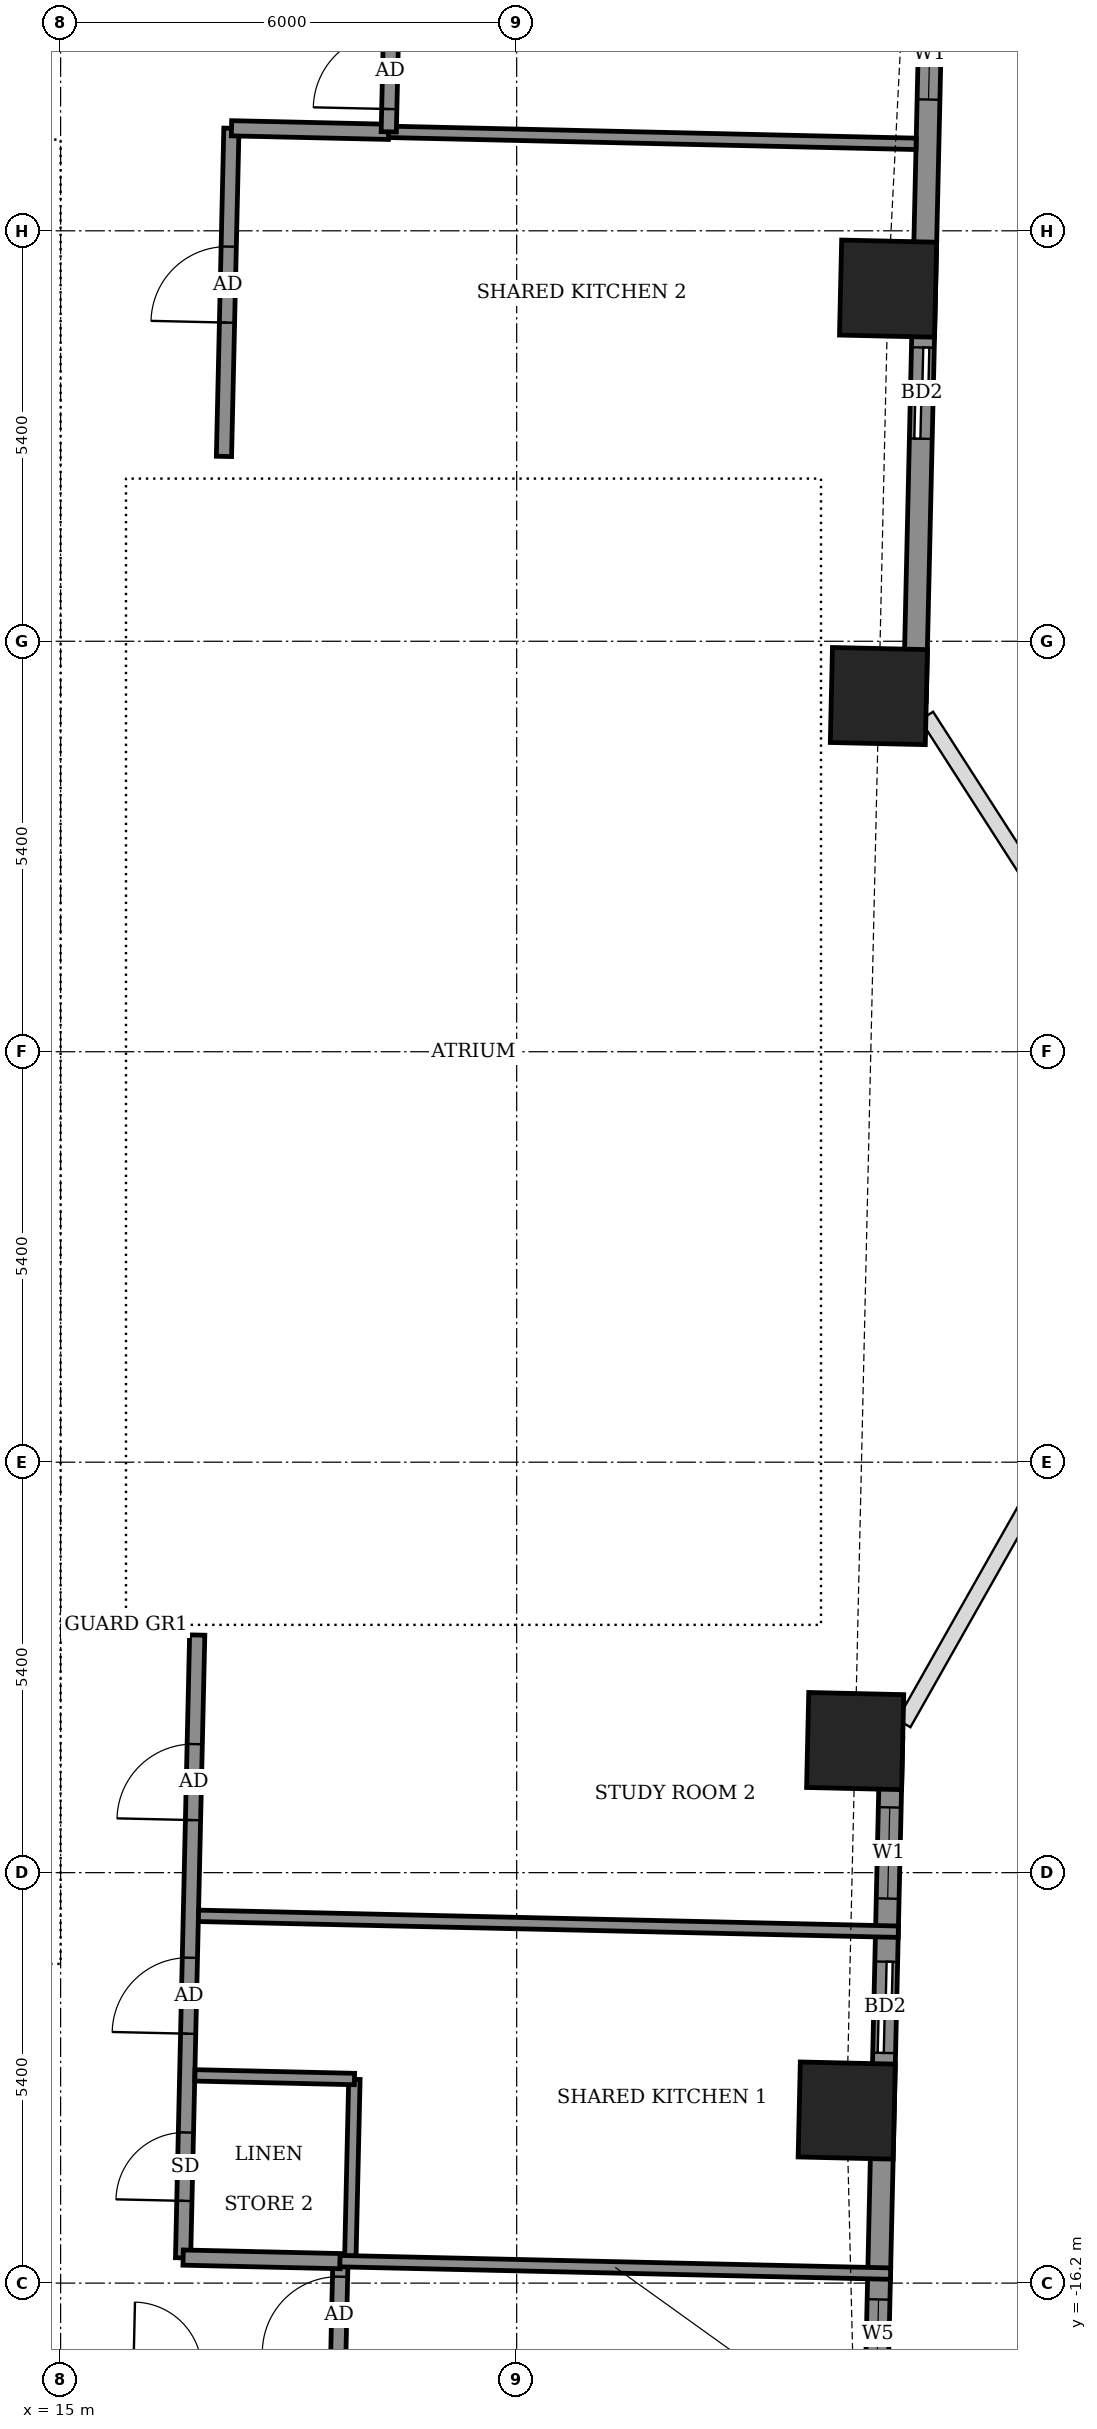
"""IFC4 building model, lengths in metres.
Left out: names, types, materials, properties, quantities, classifications, styles, units other than length and angle.
Written with IfcOpenShell. Run it as: python <this file> out.ifc"""

import sys

from ifc_helpers import new_model, si_unit, direction, frame, frame_2d, origin, origin_2d, place, context, subcontext, project, spatial, rectangle, extrude, element, fill, save


model = new_model("IFC4")
c1 = context("Model", 3, precision=1e-05, world=origin(), true_north=direction((0.0, 1.0)))
c2 = subcontext(c1, "Body", "Model", "MODEL_VIEW")
j1 = project(units=[si_unit("LENGTHUNIT", "METRE"), si_unit("PLANEANGLEUNIT", "RADIAN")], contexts=[c1])
p1 = place(None, origin())
s1 = spatial("IfcSite", under=j1, at=p1, CompositionType="ELEMENT")
p2 = place(p1, origin())
s2 = spatial("IfcBuilding", under=s1, at=p2, CompositionType="ELEMENT")
p3 = place(p2, frame((0.0, 0.0, 163.5)))
s3 = spatial("IfcBuildingStorey", under=s2, at=p3, CompositionType="ELEMENT", Elevation=163.5)
for number, where, z_axis, x_axis in (
    (1, (25.342, -13.93, -0.55), (0.0, 0.0, 1.0), (0.023, 1.0, 0.0)),
    (2, (25.453, -9.069, -0.55), (0.0, 0.0, 1.0), (0.023, 1.0, 0.0)),
    (3, (25.765, 4.679, -0.55), (0.0, 0.0, 1.0), (0.023, 1.0, 0.0)),
    (4, (25.886, 10.039, -0.55), (0.0, 0.0, 1.0), (0.023, 1.0, 0.0)),
):
    element("IfcColumn", number, at=place(p3, frame(where, z_axis=z_axis, x_axis=x_axis)), inside=s3, PredefinedType="COLUMN", context=c2, shape_type="SweptSolid", body=[
        extrude(rectangle(XDim=1.25, YDim=1.25, at=origin_2d()), origin(), (0.0, 0.0, 1.0), 3.6),
    ])
p4 = place(p3, frame((25.71, -18.651, 0.0), z_axis=(0.0, 0.0, 1.0), x_axis=(0.02274444447, 0.999741311663, 0.0)))
e5 = element("IfcWall", 5, at=p4, inside=s3, PredefinedType="SOLIDWALL", context=c2, shape_type="SweptSolid", body=[
    extrude(rectangle(XDim=9.628, YDim=0.3, at=frame_2d((4.814, 0.0))), origin(), (0.0, 0.0, 1.0), 2.55),
])
p5 = place(p4, frame((1.337, 0.0, 0.9)))
e6 = element("IfcOpeningElement", 6, at=p5, cuts=e5, PredefinedType="OPENING", context=c2, shape_type="SweptSolid", body=[
    extrude(rectangle(XDim=0.9, YDim=1.5, at=frame_2d((0.45, 0.75))), frame((0.0, 0.16, 0.0), z_axis=(0.0, -1.0, 0.0), x_axis=(1.0, 0.0, 0.0)), (0.0, 0.0, 1.0), 0.32),
])
p6 = place(p4, frame((5.481, 0.0, 0.0)))
e7 = element("IfcOpeningElement", 7, at=p6, cuts=e5, PredefinedType="OPENING", context=c2, shape_type="SweptSolid", body=[
    extrude(rectangle(XDim=1.2, YDim=2.4, at=frame_2d((0.6, 1.2))), frame((0.0, 0.16, 0.0), z_axis=(0.0, -1.0, 0.0), x_axis=(1.0, 0.0, 0.0)), (0.0, 0.0, 1.0), 0.32),
])
p7 = place(p4, frame((7.512, 0.0, 0.9)))
e8 = element("IfcOpeningElement", 8, at=p7, cuts=e5, PredefinedType="OPENING", context=c2, shape_type="SweptSolid", body=[
    extrude(rectangle(XDim=1.2, YDim=1.5, at=frame_2d((0.6, 0.75))), frame((0.0, 0.16, 0.0), z_axis=(0.0, -1.0, 0.0), x_axis=(1.0, 0.0, 0.0)), (0.0, 0.0, 1.0), 0.32),
])
p8 = place(p3, frame((26.238, 4.613, 0.0), z_axis=(0.0, 0.0, 1.0), x_axis=(0.022761056451, 0.999740933597, 0.0)))
e9 = element("IfcWall", 9, at=p8, inside=s3, PredefinedType="SOLIDWALL", context=c2, shape_type="SweptSolid", body=[
    extrude(rectangle(XDim=10.63, YDim=0.3, at=frame_2d((5.315, 0.0))), origin(), (0.0, 0.0, 1.0), 3.05),
])
p9 = place(p8, frame((3.453, 0.0, 0.0)))
e10 = element("IfcOpeningElement", 10, at=p9, cuts=e9, PredefinedType="OPENING", context=c2, shape_type="SweptSolid", body=[
    extrude(rectangle(XDim=1.2, YDim=2.4, at=frame_2d((0.6, 1.2))), frame((0.0, 0.16, 0.0), z_axis=(0.0, -1.0, 0.0), x_axis=(1.0, 0.0, 0.0)), (0.0, 0.0, 1.0), 0.32),
])
p10 = place(p8, frame((7.916, 0.0, 0.9)))
e11 = element("IfcOpeningElement", 11, at=p10, cuts=e9, PredefinedType="OPENING", context=c2, shape_type="SweptSolid", body=[
    extrude(rectangle(XDim=1.2, YDim=1.5, at=frame_2d((0.6, 0.75))), frame((0.0, 0.16, 0.0), z_axis=(0.0, -1.0, 0.0), x_axis=(1.0, 0.0, 0.0)), (0.0, 0.0, 1.0), 0.32),
])
p11 = place(p3, frame((18.647, -17.415, 0.0), z_axis=(0.0, 0.0, 1.0), x_axis=(0.022617910375, 0.999744182344, 0.0)))
e12 = element("IfcWall", 12, at=p11, inside=s3, PredefinedType="PARTITIONING", context=c2, shape_type="SweptSolid", body=[
    extrude(rectangle(XDim=1.5, YDim=0.2, at=frame_2d((0.75, 0.0))), origin(), (0.0, 0.0, 1.0), 3.05),
])
p12 = place(p11, frame((0.3, 0.0, 0.0)))
e13 = element("IfcOpeningElement", 13, at=p12, cuts=e12, PredefinedType="OPENING", context=c2, shape_type="SweptSolid", body=[
    extrude(rectangle(XDim=1.0, YDim=2.1, at=frame_2d((0.5, 1.05))), frame((0.0, 0.11, 0.0), z_axis=(0.0, -1.0, 0.0), x_axis=(1.0, 0.0, 0.0)), (0.0, 0.0, 1.0), 0.22),
])
p13 = place(p3, frame((16.611, -15.868, 0.0), z_axis=(0.0, 0.0, 1.0), x_axis=(0.022698399288, 0.999742358145, 0.0)))
e14 = element("IfcWall", 14, at=p13, inside=s3, PredefinedType="PARTITIONING", context=c2, shape_type="SweptSolid", body=[
    extrude(rectangle(XDim=8.196, YDim=0.2, at=frame_2d((4.098, 0.0))), origin(), (0.0, 0.0, 1.0), 3.05),
])
p14 = place(p13, frame((2.95, 0.0, 0.0)))
e15 = element("IfcOpeningElement", 15, at=p14, cuts=e14, PredefinedType="OPENING", context=c2, shape_type="SweptSolid", body=[
    extrude(rectangle(XDim=1.0, YDim=2.1, at=frame_2d((0.5, 1.05))), frame((0.0, 0.11, 0.0), z_axis=(0.0, -1.0, 0.0), x_axis=(1.0, 0.0, 0.0)), (0.0, 0.0, 1.0), 0.22),
])
p15 = place(p13, frame((0.75, 0.0, 0.0)))
e16 = element("IfcOpeningElement", 16, at=p15, cuts=e14, PredefinedType="OPENING", context=c2, shape_type="SweptSolid", body=[
    extrude(rectangle(XDim=0.9, YDim=2.1, at=frame_2d((0.45, 1.05))), frame((0.0, 0.11, 0.0), z_axis=(0.0, -1.0, 0.0), x_axis=(1.0, 0.0, 0.0)), (0.0, 0.0, 1.0), 0.22),
])
p16 = place(p13, frame((5.761, 0.0, 0.0)))
e17 = element("IfcOpeningElement", 17, at=p16, cuts=e14, PredefinedType="OPENING", context=c2, shape_type="SweptSolid", body=[
    extrude(rectangle(XDim=1.0, YDim=2.1, at=frame_2d((0.5, 1.05))), frame((0.0, 0.11, 0.0), z_axis=(0.0, -1.0, 0.0), x_axis=(1.0, 0.0, 0.0)), (0.0, 0.0, 1.0), 0.22),
])
p17 = place(p3, frame((18.812, -15.843, 0.0), z_axis=(0.0, 0.0, 1.0), x_axis=(0.02279059109, 0.999740260747, 0.0)))
e18 = element("IfcWall", 18, at=p17, inside=s3, PredefinedType="PARTITIONING", context=c2, shape_type="SweptSolid", body=[
    extrude(rectangle(XDim=2.324, YDim=0.15, at=frame_2d((1.162, 0.0))), origin(), (0.0, 0.0, 1.0), 3.05),
])
p18 = place(p3, frame((16.612, -15.864, 0.0), z_axis=(0.0, 0.0, 1.0), x_axis=(0.999742931749, -0.02267312106, 0.0)))
e19 = element("IfcWall", 19, at=p18, inside=s3, PredefinedType="PARTITIONING", context=c2, shape_type="SweptSolid", body=[
    extrude(rectangle(XDim=2.067, YDim=0.2, at=frame_2d((1.034, 0.0))), origin(), (0.0, 0.0, 1.0), 3.05),
])
p19 = place(p3, frame((18.675, -15.911, 0.0), z_axis=(0.0, 0.0, 1.0), x_axis=(0.999743624132, -0.022642570706, 0.0)))
e20 = element("IfcWall", 20, at=p19, inside=s3, PredefinedType="PARTITIONING", context=c2, shape_type="SweptSolid", body=[
    extrude(rectangle(XDim=7.246, YDim=0.15, at=frame_2d((3.623, 0.0))), origin(), (0.0, 0.0, 1.0), 2.55),
])
p20 = place(p3, frame((16.767, -13.467, 0.0), z_axis=(0.0, 0.0, 1.0), x_axis=(0.999740212033, -0.022792727877, 0.0)))
e21 = element("IfcWall", 21, at=p20, inside=s3, PredefinedType="PARTITIONING", context=c2, shape_type="SweptSolid", body=[
    extrude(rectangle(XDim=2.099, YDim=0.15, at=frame_2d((1.05, 0.0))), origin(), (0.0, 0.0, 1.0), 3.05),
])
p21 = place(p3, frame((16.814, -11.368, 0.0), z_axis=(0.0, 0.0, 1.0), x_axis=(0.999742492059, -0.02269250035, 0.0)))
e22 = element("IfcWall", 22, at=p21, inside=s3, PredefinedType="PARTITIONING", context=c2, shape_type="SweptSolid", body=[
    extrude(rectangle(XDim=9.209, YDim=0.15, at=frame_2d((4.605, 0.0))), origin(), (0.0, 0.0, 1.0), 2.55),
])
p22 = place(p3, frame((17.149, 7.832, 0.0), z_axis=(0.0, 0.0, 1.0), x_axis=(0.022729111383, 0.999741660378, 0.0)))
e23 = element("IfcWall", 23, at=p22, inside=s3, PredefinedType="PARTITIONING", context=c2, shape_type="SweptSolid", body=[
    extrude(rectangle(XDim=4.318, YDim=0.2, at=frame_2d((2.159, 0.0))), origin(), (0.0, 0.0, 1.0), 3.05),
])
p23 = place(p22, frame((1.761, 0.0, 0.0)))
e24 = element("IfcOpeningElement", 24, at=p23, cuts=e23, PredefinedType="OPENING", context=c2, shape_type="SweptSolid", body=[
    extrude(rectangle(XDim=1.0, YDim=2.1, at=frame_2d((0.5, 1.05))), frame((0.0, 0.11, 0.0), z_axis=(0.0, -1.0, 0.0), x_axis=(1.0, 0.0, 0.0)), (0.0, 0.0, 1.0), 0.22),
])
p24 = place(p3, frame((17.248, 12.149, 0.0), z_axis=(0.0, 0.0, 1.0), x_axis=(0.999742931749, -0.02267312106, 0.0)))
e25 = element("IfcWall", 25, at=p24, inside=s3, PredefinedType="PARTITIONING", context=c2, shape_type="SweptSolid", body=[
    extrude(rectangle(XDim=2.067, YDim=0.2, at=frame_2d((1.034, 0.0))), origin(), (0.0, 0.0, 1.0), 3.05),
])
p25 = place(p3, frame((19.315, 12.102, 0.0), z_axis=(0.0, 0.0, 1.0), x_axis=(0.999741072391, -0.022754959327, 0.0)))
e26 = element("IfcWall", 26, at=p25, inside=s3, PredefinedType="PARTITIONING", context=c2, shape_type="SweptSolid", body=[
    extrude(rectangle(XDim=6.942, YDim=0.15, at=frame_2d((3.471, 0.0))), origin(), (0.0, 0.0, 1.0), 2.55),
])
p26 = place(p3, frame((19.317, 12.102, 0.0), z_axis=(0.0, 0.0, 1.0), x_axis=(0.02279537805, 0.999740151609, 0.0)))
e27 = element("IfcWall", 27, at=p26, inside=s3, PredefinedType="PARTITIONING", context=c2, shape_type="SweptSolid", body=[
    extrude(rectangle(XDim=1.5, YDim=0.2, at=frame_2d((0.75, 0.0))), origin(), (0.0, 0.0, 1.0), 3.05),
])
p27 = place(p26, frame((0.3, 0.0, 0.0)))
e28 = element("IfcOpeningElement", 28, at=p27, cuts=e27, PredefinedType="OPENING", context=c2, shape_type="SweptSolid", body=[
    extrude(rectangle(XDim=1.0, YDim=2.1, at=frame_2d((0.5, 1.05))), frame((0.0, 0.11, 0.0), z_axis=(0.0, -1.0, 0.0), x_axis=(1.0, 0.0, 0.0)), (0.0, 0.0, 1.0), 0.22),
])
p28 = place(p5, origin())
e29 = element("IfcWindow", 29, at=p28, inside=s3, PartitioningType="SINGLE_PANEL", PredefinedType="WINDOW", context=c2, shape_type="SweptSolid", body=[
    extrude(rectangle(XDim=0.9, YDim=1.5, at=frame_2d((0.45, 0.75))), frame((0.0, 0.03, 0.0), z_axis=(0.0, -1.0, 0.0), x_axis=(1.0, 0.0, 0.0)), (0.0, 0.0, 1.0), 0.06),
])
fill(e6, e29)
p29 = place(p6, origin())
e30 = element("IfcDoor", 30, at=p29, inside=s3, OperationType="SLIDING_TO_LEFT", PredefinedType="DOOR", context=c2, shape_type="SweptSolid", body=[
    extrude(rectangle(XDim=1.2, YDim=2.4, at=frame_2d((0.6, 1.2))), frame((0.0, 0.025, 0.0), z_axis=(0.0, -1.0, 0.0), x_axis=(1.0, 0.0, 0.0)), (0.0, 0.0, 1.0), 0.05),
])
fill(e7, e30)
p30 = place(p7, origin())
e31 = element("IfcWindow", 31, at=p30, inside=s3, PartitioningType="SINGLE_PANEL", PredefinedType="WINDOW", context=c2, shape_type="SweptSolid", body=[
    extrude(rectangle(XDim=1.2, YDim=1.5, at=frame_2d((0.6, 0.75))), frame((0.0, 0.03, 0.0), z_axis=(0.0, -1.0, 0.0), x_axis=(1.0, 0.0, 0.0)), (0.0, 0.0, 1.0), 0.06),
])
fill(e8, e31)
p31 = place(p9, origin())
e32 = element("IfcDoor", 32, at=p31, inside=s3, OperationType="SLIDING_TO_LEFT", PredefinedType="DOOR", context=c2, shape_type="SweptSolid", body=[
    extrude(rectangle(XDim=1.2, YDim=2.4, at=frame_2d((0.6, 1.2))), frame((0.0, 0.025, 0.0), z_axis=(0.0, -1.0, 0.0), x_axis=(1.0, 0.0, 0.0)), (0.0, 0.0, 1.0), 0.05),
])
fill(e10, e32)
p32 = place(p10, origin())
e33 = element("IfcWindow", 33, at=p32, inside=s3, PartitioningType="SINGLE_PANEL", PredefinedType="WINDOW", context=c2, shape_type="SweptSolid", body=[
    extrude(rectangle(XDim=1.2, YDim=1.5, at=frame_2d((0.6, 0.75))), frame((0.0, 0.03, 0.0), z_axis=(0.0, -1.0, 0.0), x_axis=(1.0, 0.0, 0.0)), (0.0, 0.0, 1.0), 0.06),
])
fill(e11, e33)
p33 = place(p12, origin())
e34 = element("IfcDoor", 34, at=p33, inside=s3, OperationType="SINGLE_SWING_RIGHT", PredefinedType="DOOR", context=c2, shape_type="SweptSolid", body=[
    extrude(rectangle(XDim=1.0, YDim=2.1, at=frame_2d((0.5, 1.05))), frame((0.0, 0.025, 0.0), z_axis=(0.0, -1.0, 0.0), x_axis=(1.0, 0.0, 0.0)), (0.0, 0.0, 1.0), 0.05),
])
fill(e13, e34)
p34 = place(p14, origin())
e35 = element("IfcDoor", 35, at=p34, inside=s3, OperationType="SINGLE_SWING_LEFT", PredefinedType="DOOR", context=c2, shape_type="SweptSolid", body=[
    extrude(rectangle(XDim=1.0, YDim=2.1, at=frame_2d((0.5, 1.05))), frame((0.0, 0.025, 0.0), z_axis=(0.0, -1.0, 0.0), x_axis=(1.0, 0.0, 0.0)), (0.0, 0.0, 1.0), 0.05),
])
fill(e15, e35)
p35 = place(p15, origin())
e36 = element("IfcDoor", 36, at=p35, inside=s3, OperationType="SINGLE_SWING_RIGHT", PredefinedType="DOOR", context=c2, shape_type="SweptSolid", body=[
    extrude(rectangle(XDim=0.9, YDim=2.1, at=frame_2d((0.45, 1.05))), frame((0.0, 0.025, 0.0), z_axis=(0.0, -1.0, 0.0), x_axis=(1.0, 0.0, 0.0)), (0.0, 0.0, 1.0), 0.05),
])
fill(e16, e36)
p36 = place(p16, origin())
e37 = element("IfcDoor", 37, at=p36, inside=s3, OperationType="SINGLE_SWING_RIGHT", PredefinedType="DOOR", context=c2, shape_type="SweptSolid", body=[
    extrude(rectangle(XDim=1.0, YDim=2.1, at=frame_2d((0.5, 1.05))), frame((0.0, 0.025, 0.0), z_axis=(0.0, -1.0, 0.0), x_axis=(1.0, 0.0, 0.0)), (0.0, 0.0, 1.0), 0.05),
])
fill(e17, e37)
p37 = place(p23, origin())
e38 = element("IfcDoor", 38, at=p37, inside=s3, OperationType="SINGLE_SWING_LEFT", PredefinedType="DOOR", context=c2, shape_type="SweptSolid", body=[
    extrude(rectangle(XDim=1.0, YDim=2.1, at=frame_2d((0.5, 1.05))), frame((0.0, 0.025, 0.0), z_axis=(0.0, -1.0, 0.0), x_axis=(1.0, 0.0, 0.0)), (0.0, 0.0, 1.0), 0.05),
])
fill(e24, e38)
p38 = place(p27, origin())
e39 = element("IfcDoor", 39, at=p38, inside=s3, OperationType="SINGLE_SWING_RIGHT", PredefinedType="DOOR", context=c2, shape_type="SweptSolid", body=[
    extrude(rectangle(XDim=1.0, YDim=2.1, at=frame_2d((0.5, 1.05))), frame((0.0, 0.025, 0.0), z_axis=(0.0, -1.0, 0.0), x_axis=(1.0, 0.0, 0.0)), (0.0, 0.0, 1.0), 0.05),
])
fill(e28, e39)
save(model, sys.argv[1])
